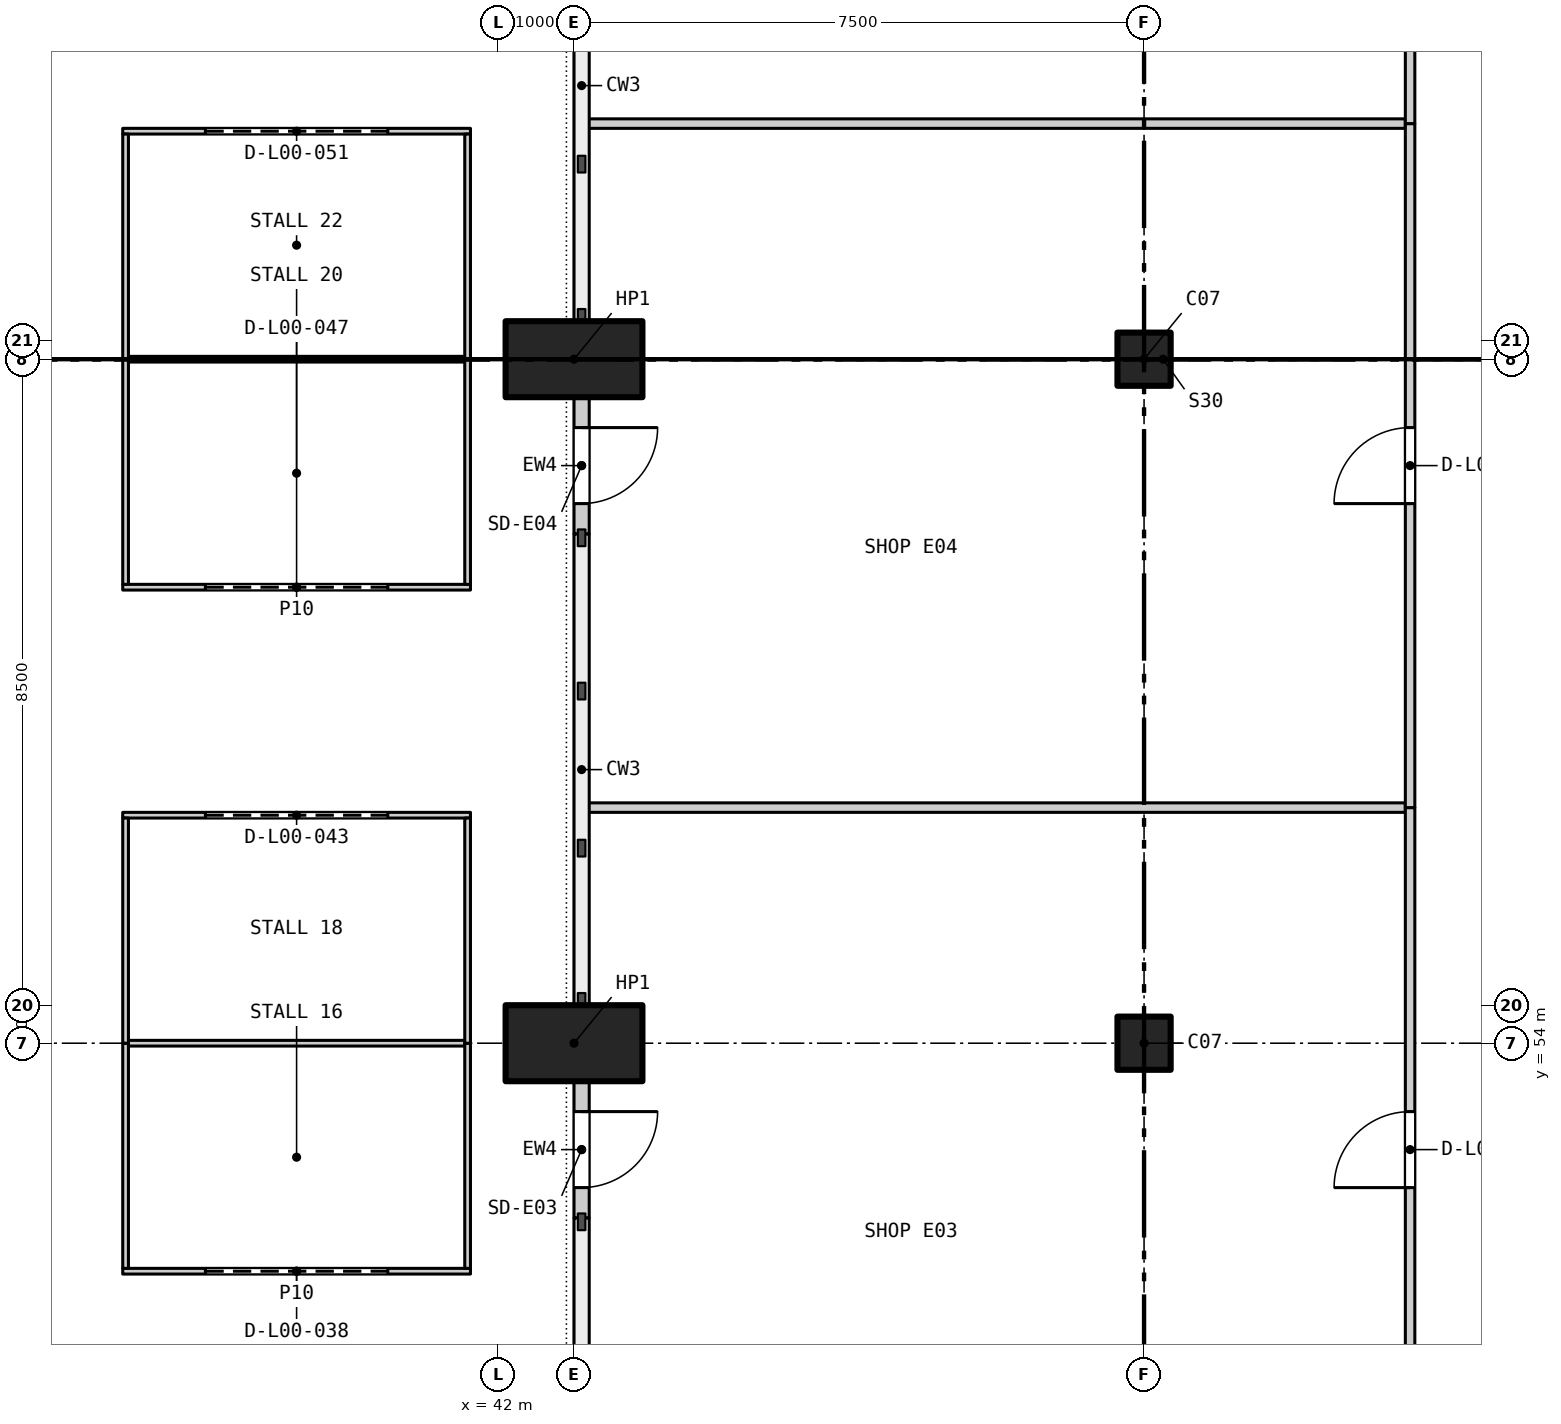
"""IFC4 building model, lengths in metres.
Left out: names, types, materials, properties, quantities, classifications, styles, units other than length and angle.
Written with IfcOpenShell. Run it as: python <this file> out.ifc"""

import sys

from ifc_helpers import new_model, si_unit, direction, frame, frame_2d, origin, origin_2d, place, context, subcontext, project, spatial, rectangle, extrude, element, fill, save


model = new_model("IFC4")
c1 = context("Model", 3, precision=1e-05, world=origin(), true_north=direction((0.0, 1.0)))
c2 = subcontext(c1, "Body", "Model", "MODEL_VIEW")
j1 = project(units=[si_unit("LENGTHUNIT", "METRE"), si_unit("PLANEANGLEUNIT", "RADIAN")], contexts=[c1])
p1 = place(None, origin())
s1 = spatial("IfcSite", under=j1, at=p1, CompositionType="ELEMENT")
p2 = place(p1, origin())
s2 = spatial("IfcBuilding", under=s1, at=p2, CompositionType="ELEMENT")
p3 = place(p2, origin())
s3 = spatial("IfcBuildingStorey", under=s2, at=p3, CompositionType="ELEMENT", Elevation=0.0)
for number, where, z_axis, x_axis in (
    (1, (50.5, 54.0, 0.0), (0.0, 0.0, 1.0), (1.0, 0.0, 0.0)),
    (2, (50.5, 63.0, 0.0), (0.0, 0.0, 1.0), (1.0, 0.0, 0.0)),
):
    element("IfcColumn", number, at=place(p3, frame(where, z_axis=z_axis, x_axis=x_axis)), inside=s3, PredefinedType="COLUMN", context=c2, shape_type="SweptSolid", body=[
        extrude(rectangle(XDim=0.7, YDim=0.7, at=origin_2d()), origin(), (0.0, 0.0, 1.0), 6.0),
    ])
for number, where, z_axis, x_axis in (
    (3, (43.0, 54.0, 0.0), (0.0, 0.0, 1.0), (1.0, 0.0, 0.0)),
    (4, (43.0, 63.0, 0.0), (0.0, 0.0, 1.0), (1.0, 0.0, 0.0)),
):
    element("IfcColumn", number, at=place(p3, frame(where, z_axis=z_axis, x_axis=x_axis)), inside=s3, PredefinedType="COLUMN", context=c2, shape_type="SweptSolid", body=[
        extrude(rectangle(XDim=1.8, YDim=1.0, at=origin_2d()), origin(), (0.0, 0.0, 1.0), 6.0),
    ])
p4 = place(p3, frame((43.1, 51.7, 0.0), z_axis=(0.0, 0.0, 1.0), x_axis=(0.0, 1.0, 0.0)))
e5 = element("IfcWall", 5, at=p4, inside=s3, PredefinedType="PARTITIONING", context=c2, shape_type="SweptSolid", body=[
    extrude(rectangle(XDim=1.8, YDim=0.2, at=frame_2d((0.9, 0.0))), origin(), (0.0, 0.0, 1.0), 5.8),
])
p5 = place(p4, frame((0.4, 0.0, 0.0)))
e6 = element("IfcOpeningElement", 6, at=p5, cuts=e5, PredefinedType="OPENING", context=c2, shape_type="SweptSolid", body=[
    extrude(rectangle(XDim=1.0, YDim=2.4, at=frame_2d((0.5, 1.2))), frame((0.0, 0.11, 0.0), z_axis=(0.0, -1.0, 0.0), x_axis=(1.0, 0.0, 0.0)), (0.0, 0.0, 1.0), 0.22),
])
p6 = place(p3, frame((43.1, 60.7, 0.0), z_axis=(0.0, 0.0, 1.0), x_axis=(0.0, 1.0, 0.0)))
e7 = element("IfcWall", 7, at=p6, inside=s3, PredefinedType="PARTITIONING", context=c2, shape_type="SweptSolid", body=[
    extrude(rectangle(XDim=1.8, YDim=0.2, at=frame_2d((0.9, 0.0))), origin(), (0.0, 0.0, 1.0), 5.8),
])
p7 = place(p6, frame((0.4, 0.0, 0.0)))
e8 = element("IfcOpeningElement", 8, at=p7, cuts=e7, PredefinedType="OPENING", context=c2, shape_type="SweptSolid", body=[
    extrude(rectangle(XDim=1.0, YDim=2.4, at=frame_2d((0.5, 1.2))), frame((0.0, 0.11, 0.0), z_axis=(0.0, -1.0, 0.0), x_axis=(1.0, 0.0, 0.0)), (0.0, 0.0, 1.0), 0.22),
])
p8 = place(p3, frame((37.062, 51.0, 0.0), z_axis=(0.0, 0.0, 1.0), x_axis=(1.0, 0.0, 0.0)))
e9 = element("IfcWall", 9, at=p8, inside=s3, PredefinedType="PARTITIONING", context=c2, shape_type="SweptSolid", body=[
    extrude(rectangle(XDim=4.575, YDim=0.075, at=frame_2d((2.288, 0.0))), origin(), (0.0, 0.0, 1.0), 3.0),
])
p9 = place(p8, frame((1.087, 0.0, 0.0)))
e10 = element("IfcOpeningElement", 10, at=p9, cuts=e9, PredefinedType="OPENING", context=c2, shape_type="SweptSolid", body=[
    extrude(rectangle(XDim=2.4, YDim=2.4, at=frame_2d((1.2, 1.2))), frame((0.0, 0.047, 0.0), z_axis=(0.0, -1.0, 0.0), x_axis=(1.0, 0.0, 0.0)), (0.0, 0.0, 1.0), 0.095),
])
p10 = place(p3, frame((37.137, 54.0, 0.0), z_axis=(0.0, 0.0, 1.0), x_axis=(1.0, 0.0, 0.0)))
e11 = element("IfcWall", 11, at=p10, inside=s3, PredefinedType="PARTITIONING", context=c2, shape_type="SweptSolid", body=[
    extrude(rectangle(XDim=4.425, YDim=0.075, at=frame_2d((2.212, 0.0))), origin(), (0.0, 0.0, 1.0), 3.0),
])
p11 = place(p3, frame((37.062, 57.0, 0.0), z_axis=(0.0, 0.0, 1.0), x_axis=(1.0, 0.0, 0.0)))
e12 = element("IfcWall", 12, at=p11, inside=s3, PredefinedType="PARTITIONING", context=c2, shape_type="SweptSolid", body=[
    extrude(rectangle(XDim=4.575, YDim=0.075, at=frame_2d((2.288, 0.0))), origin(), (0.0, 0.0, 1.0), 3.0),
])
p12 = place(p11, frame((1.087, 0.0, 0.0)))
e13 = element("IfcOpeningElement", 13, at=p12, cuts=e12, PredefinedType="OPENING", context=c2, shape_type="SweptSolid", body=[
    extrude(rectangle(XDim=2.4, YDim=2.4, at=frame_2d((1.2, 1.2))), frame((0.0, 0.047, 0.0), z_axis=(0.0, -1.0, 0.0), x_axis=(1.0, 0.0, 0.0)), (0.0, 0.0, 1.0), 0.095),
])
p13 = place(p3, frame((43.1, 57.1, 0.0), z_axis=(0.0, 0.0, 1.0), x_axis=(1.0, 0.0, 0.0)))
e14 = element("IfcWall", 14, at=p13, inside=s3, PredefinedType="PARTITIONING", context=c2, shape_type="SweptSolid", body=[
    extrude(rectangle(XDim=10.837, YDim=0.125, at=frame_2d((5.419, 0.0))), origin(), (0.0, 0.0, 1.0), 5.8),
])
p14 = place(p3, frame((37.062, 60.0, 0.0), z_axis=(0.0, 0.0, 1.0), x_axis=(1.0, 0.0, 0.0)))
e15 = element("IfcWall", 15, at=p14, inside=s3, PredefinedType="PARTITIONING", context=c2, shape_type="SweptSolid", body=[
    extrude(rectangle(XDim=4.575, YDim=0.075, at=frame_2d((2.288, 0.0))), origin(), (0.0, 0.0, 1.0), 3.0),
])
p15 = place(p14, frame((1.087, 0.0, 0.0)))
e16 = element("IfcOpeningElement", 16, at=p15, cuts=e15, PredefinedType="OPENING", context=c2, shape_type="SweptSolid", body=[
    extrude(rectangle(XDim=2.4, YDim=2.4, at=frame_2d((1.2, 1.2))), frame((0.0, 0.047, 0.0), z_axis=(0.0, -1.0, 0.0), x_axis=(1.0, 0.0, 0.0)), (0.0, 0.0, 1.0), 0.095),
])
p16 = place(p3, frame((37.137, 63.0, 0.0), z_axis=(0.0, 0.0, 1.0), x_axis=(1.0, 0.0, 0.0)))
e17 = element("IfcWall", 17, at=p16, inside=s3, PredefinedType="PARTITIONING", context=c2, shape_type="SweptSolid", body=[
    extrude(rectangle(XDim=4.425, YDim=0.075, at=frame_2d((2.212, 0.0))), origin(), (0.0, 0.0, 1.0), 3.0),
])
p17 = place(p3, frame((37.062, 66.0, 0.0), z_axis=(0.0, 0.0, 1.0), x_axis=(1.0, 0.0, 0.0)))
e18 = element("IfcWall", 18, at=p17, inside=s3, PredefinedType="PARTITIONING", context=c2, shape_type="SweptSolid", body=[
    extrude(rectangle(XDim=4.575, YDim=0.075, at=frame_2d((2.288, 0.0))), origin(), (0.0, 0.0, 1.0), 3.0),
])
p18 = place(p17, frame((1.087, 0.0, 0.0)))
e19 = element("IfcOpeningElement", 19, at=p18, cuts=e18, PredefinedType="OPENING", context=c2, shape_type="SweptSolid", body=[
    extrude(rectangle(XDim=2.4, YDim=2.4, at=frame_2d((1.2, 1.2))), frame((0.0, 0.047, 0.0), z_axis=(0.0, -1.0, 0.0), x_axis=(1.0, 0.0, 0.0)), (0.0, 0.0, 1.0), 0.095),
])
p19 = place(p3, frame((43.1, 66.1, 0.0), z_axis=(0.0, 0.0, 1.0), x_axis=(1.0, 0.0, 0.0)))
e20 = element("IfcWall", 20, at=p19, inside=s3, PredefinedType="PARTITIONING", context=c2, shape_type="SweptSolid", body=[
    extrude(rectangle(XDim=10.837, YDim=0.125, at=frame_2d((5.419, 0.0))), origin(), (0.0, 0.0, 1.0), 5.8),
])
for number, where, z_axis, x_axis in (
    (21, (37.1, 51.038, 0.0), (0.0, 0.0, 1.0), (0.0, 1.0, 0.0)),
    (22, (37.1, 54.0, 0.0), (0.0, 0.0, 1.0), (0.0, 1.0, 0.0)),
    (23, (37.1, 60.038, 0.0), (0.0, 0.0, 1.0), (0.0, 1.0, 0.0)),
    (24, (37.1, 63.0, 0.0), (0.0, 0.0, 1.0), (0.0, 1.0, 0.0)),
    (25, (41.6, 51.038, 0.0), (0.0, 0.0, 1.0), (0.0, 1.0, 0.0)),
    (26, (41.6, 54.0, 0.0), (0.0, 0.0, 1.0), (0.0, 1.0, 0.0)),
    (27, (41.6, 60.038, 0.0), (0.0, 0.0, 1.0), (0.0, 1.0, 0.0)),
    (28, (41.6, 63.0, 0.0), (0.0, 0.0, 1.0), (0.0, 1.0, 0.0)),
):
    element("IfcWall", number, at=place(p3, frame(where, z_axis=z_axis, x_axis=x_axis)), inside=s3, PredefinedType="PARTITIONING", context=c2, shape_type="SweptSolid", body=[
        extrude(rectangle(XDim=2.962, YDim=0.075, at=frame_2d((1.481, 0.0))), origin(), (0.0, 0.0, 1.0), 3.0),
    ])
p20 = place(p3, frame((54.0, 48.1, 0.0), z_axis=(0.0, 0.0, 1.0), x_axis=(0.0, 1.0, 0.0)))
e29 = element("IfcWall", 29, at=p20, inside=s3, PredefinedType="PARTITIONING", context=c2, shape_type="SweptSolid", body=[
    extrude(rectangle(XDim=9.0, YDim=0.125, at=frame_2d((4.5, 0.0))), origin(), (0.0, 0.0, 1.0), 5.05),
])
p21 = place(p20, frame((4.0, 0.0, 0.0)))
e30 = element("IfcOpeningElement", 30, at=p21, cuts=e29, PredefinedType="OPENING", context=c2, shape_type="SweptSolid", body=[
    extrude(rectangle(XDim=1.0, YDim=2.1, at=frame_2d((0.5, 1.05))), frame((0.0, 0.073, 0.0), z_axis=(0.0, -1.0, 0.0), x_axis=(1.0, 0.0, 0.0)), (0.0, 0.0, 1.0), 0.145),
])
p22 = place(p3, frame((54.0, 57.1, 0.0), z_axis=(0.0, 0.0, 1.0), x_axis=(0.0, 1.0, 0.0)))
e31 = element("IfcWall", 31, at=p22, inside=s3, PredefinedType="PARTITIONING", context=c2, shape_type="SweptSolid", body=[
    extrude(rectangle(XDim=9.0, YDim=0.125, at=frame_2d((4.5, 0.0))), origin(), (0.0, 0.0, 1.0), 5.05),
])
p23 = place(p22, frame((4.0, 0.0, 0.0)))
e32 = element("IfcOpeningElement", 32, at=p23, cuts=e31, PredefinedType="OPENING", context=c2, shape_type="SweptSolid", body=[
    extrude(rectangle(XDim=1.0, YDim=2.1, at=frame_2d((0.5, 1.05))), frame((0.0, 0.073, 0.0), z_axis=(0.0, -1.0, 0.0), x_axis=(1.0, 0.0, 0.0)), (0.0, 0.0, 1.0), 0.145),
])
p24 = place(p3, frame((54.0, 66.1, 0.0), z_axis=(0.0, 0.0, 1.0), x_axis=(0.0, 1.0, 0.0)))
e33 = element("IfcWall", 33, at=p24, inside=s3, PredefinedType="PARTITIONING", context=c2, shape_type="SweptSolid", body=[
    extrude(rectangle(XDim=9.0, YDim=0.125, at=frame_2d((4.5, 0.0))), origin(), (0.0, 0.0, 1.0), 5.05),
])
p25 = place(p24, frame((4.0, 0.0, 0.0)))
e34 = element("IfcOpeningElement", 34, at=p25, cuts=e33, PredefinedType="OPENING", context=c2, shape_type="SweptSolid", body=[
    extrude(rectangle(XDim=1.0, YDim=2.1, at=frame_2d((0.5, 1.05))), frame((0.0, 0.073, 0.0), z_axis=(0.0, -1.0, 0.0), x_axis=(1.0, 0.0, 0.0)), (0.0, 0.0, 1.0), 0.145),
])
p26 = place(p5, frame((1.0, 0.0, 0.0), z_axis=(0.0, 0.0, 1.0), x_axis=(-1.0, 0.0, 0.0)))
e35 = element("IfcDoor", 35, at=p26, inside=s3, OperationType="SINGLE_SWING_LEFT", PredefinedType="DOOR", context=c2, shape_type="SweptSolid", body=[
    extrude(rectangle(XDim=1.0, YDim=2.4, at=frame_2d((0.5, 1.2))), frame((0.0, 0.025, 0.0), z_axis=(0.0, -1.0, 0.0), x_axis=(1.0, 0.0, 0.0)), (0.0, 0.0, 1.0), 0.05),
])
fill(e6, e35)
p27 = place(p7, frame((1.0, 0.0, 0.0), z_axis=(0.0, 0.0, 1.0), x_axis=(-1.0, 0.0, 0.0)))
e36 = element("IfcDoor", 36, at=p27, inside=s3, OperationType="SINGLE_SWING_LEFT", PredefinedType="DOOR", context=c2, shape_type="SweptSolid", body=[
    extrude(rectangle(XDim=1.0, YDim=2.4, at=frame_2d((0.5, 1.2))), frame((0.0, 0.025, 0.0), z_axis=(0.0, -1.0, 0.0), x_axis=(1.0, 0.0, 0.0)), (0.0, 0.0, 1.0), 0.05),
])
fill(e8, e36)
p28 = place(p9, origin())
e37 = element("IfcDoor", 37, at=p28, inside=s3, OperationType="ROLLINGUP", PredefinedType="DOOR", context=c2, shape_type="SweptSolid", body=[
    extrude(rectangle(XDim=2.4, YDim=2.4, at=frame_2d((1.2, 1.2))), frame((0.0, 0.025, 0.0), z_axis=(0.0, -1.0, 0.0), x_axis=(1.0, 0.0, 0.0)), (0.0, 0.0, 1.0), 0.05),
])
fill(e10, e37)
p29 = place(p21, origin())
e38 = element("IfcDoor", 38, at=p29, inside=s3, OperationType="SINGLE_SWING_LEFT", PredefinedType="DOOR", context=c2, shape_type="SweptSolid", body=[
    extrude(rectangle(XDim=1.0, YDim=2.1, at=frame_2d((0.5, 1.05))), frame((0.0, 0.025, 0.0), z_axis=(0.0, -1.0, 0.0), x_axis=(1.0, 0.0, 0.0)), (0.0, 0.0, 1.0), 0.05),
])
fill(e30, e38)
p30 = place(p12, origin())
e39 = element("IfcDoor", 39, at=p30, inside=s3, OperationType="ROLLINGUP", PredefinedType="DOOR", context=c2, shape_type="SweptSolid", body=[
    extrude(rectangle(XDim=2.4, YDim=2.4, at=frame_2d((1.2, 1.2))), frame((0.0, 0.025, 0.0), z_axis=(0.0, -1.0, 0.0), x_axis=(1.0, 0.0, 0.0)), (0.0, 0.0, 1.0), 0.05),
])
fill(e13, e39)
p31 = place(p15, origin())
e40 = element("IfcDoor", 40, at=p31, inside=s3, OperationType="ROLLINGUP", PredefinedType="DOOR", context=c2, shape_type="SweptSolid", body=[
    extrude(rectangle(XDim=2.4, YDim=2.4, at=frame_2d((1.2, 1.2))), frame((0.0, 0.025, 0.0), z_axis=(0.0, -1.0, 0.0), x_axis=(1.0, 0.0, 0.0)), (0.0, 0.0, 1.0), 0.05),
])
fill(e16, e40)
p32 = place(p23, origin())
e41 = element("IfcDoor", 41, at=p32, inside=s3, OperationType="SINGLE_SWING_LEFT", PredefinedType="DOOR", context=c2, shape_type="SweptSolid", body=[
    extrude(rectangle(XDim=1.0, YDim=2.1, at=frame_2d((0.5, 1.05))), frame((0.0, 0.025, 0.0), z_axis=(0.0, -1.0, 0.0), x_axis=(1.0, 0.0, 0.0)), (0.0, 0.0, 1.0), 0.05),
])
fill(e32, e41)
p33 = place(p18, origin())
e42 = element("IfcDoor", 42, at=p33, inside=s3, OperationType="ROLLINGUP", PredefinedType="DOOR", context=c2, shape_type="SweptSolid", body=[
    extrude(rectangle(XDim=2.4, YDim=2.4, at=frame_2d((1.2, 1.2))), frame((0.0, 0.025, 0.0), z_axis=(0.0, -1.0, 0.0), x_axis=(1.0, 0.0, 0.0)), (0.0, 0.0, 1.0), 0.05),
])
fill(e19, e42)
save(model, sys.argv[1])
